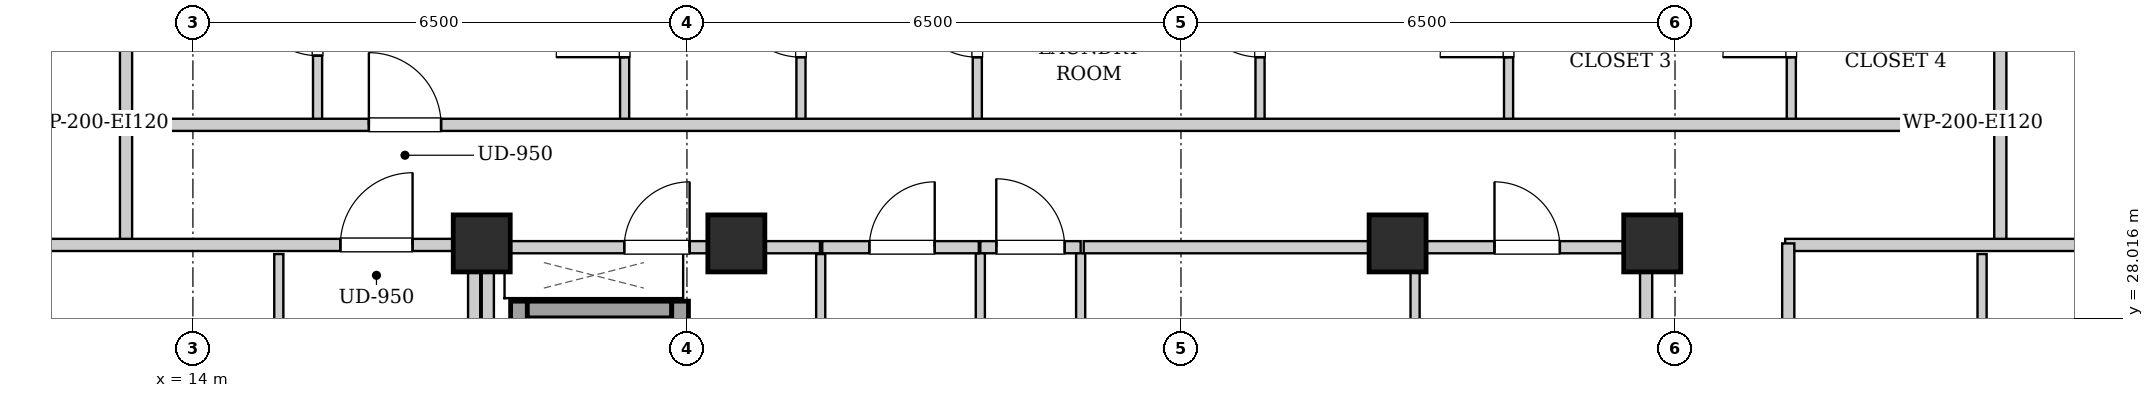
"""IFC4 building model, lengths in metres.
Left out: names, types, materials, properties, quantities, classifications, styles, units other than length and angle.
Written with IfcOpenShell. Run it as: python <this file> out.ifc"""

import sys

from ifc_helpers import new_model, si_unit, direction, frame, frame_2d, origin, origin_2d, place, context, subcontext, project, spatial, rectangle, extrude, element, fill, save


model = new_model("IFC4")
c1 = context("Model", 3, precision=1e-05, world=origin(), true_north=direction((0.0, 1.0)))
c2 = subcontext(c1, "Body", "Model", "MODEL_VIEW")
j1 = project(units=[si_unit("LENGTHUNIT", "METRE"), si_unit("PLANEANGLEUNIT", "RADIAN")], contexts=[c1])
p1 = place(None, origin())
s1 = spatial("IfcSite", under=j1, at=p1, CompositionType="ELEMENT")
p2 = place(p1, origin())
s2 = spatial("IfcBuilding", under=s1, at=p2, CompositionType="ELEMENT")
p3 = place(p2, frame((0.0, 0.0, 244.5)))
s3 = spatial("IfcBuildingStorey", under=s2, at=p3, CompositionType="ELEMENT", Elevation=244.5)
for number, where, z_axis, x_axis in (
    (1, (17.8, 29.0, 0.0), (0.0, 0.0, 1.0), (1.0, 0.0, 0.0)),
    (2, (21.15, 29.0, 0.0), (0.0, 0.0, 1.0), (1.0, 0.0, 0.0)),
    (3, (29.85, 29.0, 0.0), (0.0, 0.0, 1.0), (1.0, 0.0, 0.0)),
    (4, (33.2, 29.0, 0.0), (0.0, 0.0, 1.0), (1.0, 0.0, 0.0)),
):
    element("IfcColumn", number, at=place(p3, frame(where, z_axis=z_axis, x_axis=x_axis)), inside=s3, PredefinedType="COLUMN", context=c2, shape_type="SweptSolid", body=[
        extrude(rectangle(XDim=0.75, YDim=0.75, at=origin_2d()), origin(), (0.0, 0.0, 1.0), 3.4),
    ])
p4 = place(p3, frame((18.29, 24.1, 0.0), z_axis=(0.0, 0.0, 1.0), x_axis=(0.0, 1.0, 0.0)))
e5 = element("IfcWall", 5, at=p4, inside=s3, PredefinedType="SHEAR", context=c2, shape_type="SweptSolid", body=[
    extrude(rectangle(XDim=4.14, YDim=0.22, at=frame_2d((2.07, 0.0))), origin(), (0.0, 0.0, 1.0), 3.14),
])
p5 = place(p3, frame((18.4, 28.13, 0.0), z_axis=(0.0, 0.0, 1.0), x_axis=(1.0, 0.0, 0.0)))
e6 = element("IfcWall", 6, at=p5, inside=s3, PredefinedType="SHEAR", context=c2, shape_type="SweptSolid", body=[
    extrude(rectangle(XDim=1.9, YDim=0.22, at=frame_2d((0.95, 0.0))), origin(), (0.0, 0.0, 1.0), 3.14),
])
p6 = place(p3, frame((20.41, 26.06, 0.0), z_axis=(0.0, 0.0, 1.0), x_axis=(0.0, 1.0, 0.0)))
e7 = element("IfcWall", 7, at=p6, inside=s3, PredefinedType="SHEAR", context=c2, shape_type="SweptSolid", body=[
    extrude(rectangle(XDim=2.18, YDim=0.22, at=frame_2d((1.09, 0.0))), origin(), (0.0, 0.0, 1.0), 3.14),
])
p7 = place(p6, frame((0.54, 0.0, 0.0)))
e8 = element("IfcOpeningElement", 8, at=p7, cuts=e7, PredefinedType="OPENING", context=c2, shape_type="SweptSolid", body=[
    extrude(rectangle(XDim=1.1, YDim=2.15, at=frame_2d((0.55, 1.075))), frame((0.0, 0.12, 0.0), z_axis=(0.0, -1.0, 0.0), x_axis=(1.0, 0.0, 0.0)), (0.0, 0.0, 1.0), 0.24),
])
for number, where, z_axis, x_axis in (
    (9, (17.88, 24.12, 0.0), (0.0, 0.0, 1.0), (0.0, 1.0, 0.0)),
    (10, (33.12, 24.12, 0.0), (0.0, 0.0, 1.0), (0.0, 1.0, 0.0)),
):
    element("IfcWall", number, at=place(p3, frame(where, z_axis=z_axis, x_axis=x_axis)), inside=s3, PredefinedType="PARTITIONING", context=c2, shape_type="SweptSolid", body=[
        extrude(rectangle(XDim=4.76, YDim=0.16, at=frame_2d((2.38, 0.0))), origin(), (0.0, 0.0, 1.0), 3.14),
    ])
p8 = place(p3, frame((24.36, 28.95, 0.0), z_axis=(0.0, 0.0, 1.0), x_axis=(1.0, 0.0, 0.0)))
e11 = element("IfcWall", 11, at=p8, inside=s3, PredefinedType="PARTITIONING", context=c2, shape_type="SweptSolid", body=[
    extrude(rectangle(XDim=1.32, YDim=0.16, at=frame_2d((0.66, 0.0))), origin(), (0.0, 0.0, 1.0), 2.668),
])
p9 = place(p8, frame((0.21, 0.0, 0.0)))
e12 = element("IfcOpeningElement", 12, at=p9, cuts=e11, PredefinedType="OPENING", context=c2, shape_type="SweptSolid", body=[
    extrude(rectangle(XDim=0.9, YDim=2.05, at=frame_2d((0.45, 1.025))), frame((0.0, 0.09, 0.0), z_axis=(0.0, -1.0, 0.0), x_axis=(1.0, 0.0, 0.0)), (0.0, 0.0, 1.0), 0.18),
])
p10 = place(p3, frame((17.96, 28.95, 0.0), z_axis=(0.0, 0.0, 1.0), x_axis=(1.0, 0.0, 0.0)))
e13 = element("IfcWall", 13, at=p10, inside=s3, PredefinedType="PARTITIONING", context=c2, shape_type="SweptSolid", body=[
    extrude(rectangle(XDim=4.29, YDim=0.16, at=frame_2d((2.145, 0.0))), origin(), (0.0, 0.0, 1.0), 2.668),
])
p11 = place(p10, frame((1.715, 0.0, 0.0)))
e14 = element("IfcOpeningElement", 14, at=p11, cuts=e13, PredefinedType="OPENING", context=c2, shape_type="SweptSolid", body=[
    extrude(rectangle(XDim=0.86, YDim=2.05, at=frame_2d((0.43, 1.025))), frame((0.0, 0.09, 0.0), z_axis=(0.0, -1.0, 0.0), x_axis=(1.0, 0.0, 0.0)), (0.0, 0.0, 1.0), 0.18),
])
for number, where, z_axis, x_axis in (
    (15, (24.36, 25.0, 0.0), (0.0, 0.0, 1.0), (0.0, 1.0, 0.0)),
    (16, (25.68, 25.0, 0.0), (0.0, 0.0, 1.0), (0.0, 1.0, 0.0)),
):
    element("IfcWall", number, at=place(p3, frame(where, z_axis=z_axis, x_axis=x_axis)), inside=s3, PredefinedType="PARTITIONING", context=c2, shape_type="SweptSolid", body=[
        extrude(rectangle(XDim=3.87, YDim=0.12, at=frame_2d((1.935, 0.0))), origin(), (0.0, 0.0, 1.0), 3.14),
    ])
p12 = place(p3, frame((30.08, 26.18, 0.0), z_axis=(0.0, 0.0, 1.0), x_axis=(0.0, 1.0, 0.0)))
e17 = element("IfcWall", 17, at=p12, inside=s3, PredefinedType="PARTITIONING", context=c2, shape_type="SweptSolid", body=[
    extrude(rectangle(XDim=2.68, YDim=0.12, at=frame_2d((1.34, 0.0))), origin(), (0.0, 0.0, 1.0), 3.14),
])
p13 = place(p3, frame((30.08, 28.95, 0.0), z_axis=(0.0, 0.0, 1.0), x_axis=(1.0, 0.0, 0.0)))
e18 = element("IfcWall", 18, at=p13, inside=s3, PredefinedType="PARTITIONING", context=c2, shape_type="SweptSolid", body=[
    extrude(rectangle(XDim=2.96, YDim=0.16, at=frame_2d((1.48, 0.0))), origin(), (0.0, 0.0, 1.0), 3.14),
])
p14 = place(p13, frame((1.045, 0.0, 0.0)))
e19 = element("IfcOpeningElement", 19, at=p14, cuts=e18, PredefinedType="OPENING", context=c2, shape_type="SweptSolid", body=[
    extrude(rectangle(XDim=0.86, YDim=2.05, at=frame_2d((0.43, 1.025))), frame((0.0, 0.09, 0.0), z_axis=(0.0, -1.0, 0.0), x_axis=(1.0, 0.0, 0.0)), (0.0, 0.0, 1.0), 0.18),
])
p15 = place(p3, frame((22.26, 25.0, 0.0), z_axis=(0.0, 0.0, 1.0), x_axis=(0.0, 1.0, 0.0)))
e20 = element("IfcWall", 20, at=p15, inside=s3, PredefinedType="PARTITIONING", context=c2, shape_type="SweptSolid", body=[
    extrude(rectangle(XDim=3.86, YDim=0.12, at=frame_2d((1.93, 0.0))), origin(), (0.0, 0.0, 1.0), 3.14),
])
p16 = place(p3, frame((22.28, 28.95, 0.0), z_axis=(0.0, 0.0, 1.0), x_axis=(1.0, 0.0, 0.0)))
e21 = element("IfcWall", 21, at=p16, inside=s3, PredefinedType="PARTITIONING", context=c2, shape_type="SweptSolid", body=[
    extrude(rectangle(XDim=2.06, YDim=0.16, at=frame_2d((1.03, 0.0))), origin(), (0.0, 0.0, 1.0), 2.668),
])
p17 = place(p16, frame((0.62, 0.0, 0.0)))
e22 = element("IfcOpeningElement", 22, at=p17, cuts=e21, PredefinedType="OPENING", context=c2, shape_type="SweptSolid", body=[
    extrude(rectangle(XDim=0.86, YDim=2.05, at=frame_2d((0.43, 1.025))), frame((0.0, 0.09, 0.0), z_axis=(0.0, -1.0, 0.0), x_axis=(1.0, 0.0, 0.0)), (0.0, 0.0, 1.0), 0.18),
])
p18 = place(p3, frame((25.72, 28.95, 0.0), z_axis=(0.0, 0.0, 1.0), x_axis=(1.0, 0.0, 0.0)))
e23 = element("IfcWall", 23, at=p18, inside=s3, PredefinedType="PARTITIONING", context=c2, shape_type="SweptSolid", body=[
    extrude(rectangle(XDim=4.32, YDim=0.16, at=frame_2d((2.16, 0.0))), origin(), (0.0, 0.0, 1.0), 2.668),
])
for number, where, z_axis, x_axis in (
    (24, (13.12, 28.98, 0.0), (0.0, 0.0, 1.0), (0.0, 1.0, 0.0)),
    (25, (37.78, 28.98, 0.0), (0.0, 0.0, 1.0), (0.0, 1.0, 0.0)),
):
    element("IfcWall", number, at=place(p3, frame(where, z_axis=z_axis, x_axis=x_axis)), inside=s3, PredefinedType="PARTITIONING", context=c2, shape_type="SweptSolid", body=[
        extrude(rectangle(XDim=1.58, YDim=0.16, at=frame_2d((0.79, 0.0))), origin(), (0.0, 0.0, 1.0), 3.14),
    ])
p19 = place(p3, frame((34.95, 28.98, 0.0), z_axis=(0.0, 0.0, 1.0), x_axis=(1.0, 0.0, 0.0)))
e26 = element("IfcWall", 26, at=p19, inside=s3, PredefinedType="PARTITIONING", context=c2, shape_type="SweptSolid", body=[
    extrude(rectangle(XDim=5.07, YDim=0.16, at=frame_2d((2.535, 0.0))), origin(), (0.0, 0.0, 1.0), 2.668),
])
for number, where, z_axis, x_axis in (
    (27, (13.12, 30.6, 0.0), (0.0, 0.0, 1.0), (0.0, 1.0, 0.0)),
    (28, (37.78, 30.6, 0.0), (0.0, 0.0, 1.0), (0.0, 1.0, 0.0)),
):
    element("IfcWall", number, at=place(p3, frame(where, z_axis=z_axis, x_axis=x_axis)), inside=s3, PredefinedType="PARTITIONING", context=c2, shape_type="SweptSolid", body=[
        extrude(rectangle(XDim=2.66, YDim=0.16, at=frame_2d((1.33, 0.0))), origin(), (0.0, 0.0, 1.0), 3.14),
    ])
p20 = place(p3, frame((15.64, 30.6, 0.0), z_axis=(0.0, 0.0, 1.0), x_axis=(0.0, 1.0, 0.0)))
e29 = element("IfcWall", 29, at=p20, inside=s3, PredefinedType="PARTITIONING", context=c2, shape_type="SweptSolid", body=[
    extrude(rectangle(XDim=2.6, YDim=0.12, at=frame_2d((1.3, 0.0))), origin(), (0.0, 0.0, 1.0), 3.14),
])
p21 = place(p20, frame((0.87, 0.0, 0.0)))
e30 = element("IfcOpeningElement", 30, at=p21, cuts=e29, PredefinedType="OPENING", context=c2, shape_type="SweptSolid", body=[
    extrude(rectangle(XDim=0.86, YDim=2.05, at=frame_2d((0.43, 1.025))), frame((0.0, 0.07, 0.0), z_axis=(0.0, -1.0, 0.0), x_axis=(1.0, 0.0, 0.0)), (0.0, 0.0, 1.0), 0.14),
])
p22 = place(p3, frame((19.68, 30.6, 0.0), z_axis=(0.0, 0.0, 1.0), x_axis=(0.0, 1.0, 0.0)))
e31 = element("IfcWall", 31, at=p22, inside=s3, PredefinedType="PARTITIONING", context=c2, shape_type="SweptSolid", body=[
    extrude(rectangle(XDim=2.6, YDim=0.12, at=frame_2d((1.3, 0.0))), origin(), (0.0, 0.0, 1.0), 3.14),
])
p23 = place(p22, frame((0.85, 0.0, 0.0)))
e32 = element("IfcOpeningElement", 32, at=p23, cuts=e31, PredefinedType="OPENING", context=c2, shape_type="SweptSolid", body=[
    extrude(rectangle(XDim=0.9, YDim=2.05, at=frame_2d((0.45, 1.025))), frame((0.0, 0.07, 0.0), z_axis=(0.0, -1.0, 0.0), x_axis=(1.0, 0.0, 0.0)), (0.0, 0.0, 1.0), 0.14),
])
p24 = place(p3, frame((22.0, 30.6, 0.0), z_axis=(0.0, 0.0, 1.0), x_axis=(0.0, 1.0, 0.0)))
e33 = element("IfcWall", 33, at=p24, inside=s3, PredefinedType="PARTITIONING", context=c2, shape_type="SweptSolid", body=[
    extrude(rectangle(XDim=2.6, YDim=0.12, at=frame_2d((1.3, 0.0))), origin(), (0.0, 0.0, 1.0), 3.14),
])
p25 = place(p24, frame((0.85, 0.0, 0.0)))
e34 = element("IfcOpeningElement", 34, at=p25, cuts=e33, PredefinedType="OPENING", context=c2, shape_type="SweptSolid", body=[
    extrude(rectangle(XDim=0.9, YDim=2.05, at=frame_2d((0.45, 1.025))), frame((0.0, 0.07, 0.0), z_axis=(0.0, -1.0, 0.0), x_axis=(1.0, 0.0, 0.0)), (0.0, 0.0, 1.0), 0.14),
])
p26 = place(p3, frame((24.32, 30.6, 0.0), z_axis=(0.0, 0.0, 1.0), x_axis=(0.0, 1.0, 0.0)))
e35 = element("IfcWall", 35, at=p26, inside=s3, PredefinedType="PARTITIONING", context=c2, shape_type="SweptSolid", body=[
    extrude(rectangle(XDim=2.6, YDim=0.12, at=frame_2d((1.3, 0.0))), origin(), (0.0, 0.0, 1.0), 3.14),
])
p27 = place(p26, frame((0.85, 0.0, 0.0)))
e36 = element("IfcOpeningElement", 36, at=p27, cuts=e35, PredefinedType="OPENING", context=c2, shape_type="SweptSolid", body=[
    extrude(rectangle(XDim=0.9, YDim=2.05, at=frame_2d((0.45, 1.025))), frame((0.0, 0.07, 0.0), z_axis=(0.0, -1.0, 0.0), x_axis=(1.0, 0.0, 0.0)), (0.0, 0.0, 1.0), 0.14),
])
p28 = place(p3, frame((28.04, 30.6, 0.0), z_axis=(0.0, 0.0, 1.0), x_axis=(0.0, 1.0, 0.0)))
e37 = element("IfcWall", 37, at=p28, inside=s3, PredefinedType="PARTITIONING", context=c2, shape_type="SweptSolid", body=[
    extrude(rectangle(XDim=2.6, YDim=0.12, at=frame_2d((1.3, 0.0))), origin(), (0.0, 0.0, 1.0), 3.14),
])
p29 = place(p28, frame((0.85, 0.0, 0.0)))
e38 = element("IfcOpeningElement", 38, at=p29, cuts=e37, PredefinedType="OPENING", context=c2, shape_type="SweptSolid", body=[
    extrude(rectangle(XDim=0.9, YDim=2.05, at=frame_2d((0.45, 1.025))), frame((0.0, 0.07, 0.0), z_axis=(0.0, -1.0, 0.0), x_axis=(1.0, 0.0, 0.0)), (0.0, 0.0, 1.0), 0.14),
])
p30 = place(p3, frame((31.31, 30.6, 0.0), z_axis=(0.0, 0.0, 1.0), x_axis=(0.0, 1.0, 0.0)))
e39 = element("IfcWall", 39, at=p30, inside=s3, PredefinedType="PARTITIONING", context=c2, shape_type="SweptSolid", body=[
    extrude(rectangle(XDim=2.6, YDim=0.12, at=frame_2d((1.3, 0.0))), origin(), (0.0, 0.0, 1.0), 3.14),
])
p31 = place(p30, frame((0.85, 0.0, 0.0)))
e40 = element("IfcOpeningElement", 40, at=p31, cuts=e39, PredefinedType="OPENING", context=c2, shape_type="SweptSolid", body=[
    extrude(rectangle(XDim=0.9, YDim=2.05, at=frame_2d((0.45, 1.025))), frame((0.0, 0.07, 0.0), z_axis=(0.0, -1.0, 0.0), x_axis=(1.0, 0.0, 0.0)), (0.0, 0.0, 1.0), 0.14),
])
p32 = place(p3, frame((35.03, 30.6, 0.0), z_axis=(0.0, 0.0, 1.0), x_axis=(0.0, 1.0, 0.0)))
e41 = element("IfcWall", 41, at=p32, inside=s3, PredefinedType="PARTITIONING", context=c2, shape_type="SweptSolid", body=[
    extrude(rectangle(XDim=2.6, YDim=0.12, at=frame_2d((1.3, 0.0))), origin(), (0.0, 0.0, 1.0), 3.14),
])
p33 = place(p32, frame((0.85, 0.0, 0.0)))
e42 = element("IfcOpeningElement", 42, at=p33, cuts=e41, PredefinedType="OPENING", context=c2, shape_type="SweptSolid", body=[
    extrude(rectangle(XDim=0.9, YDim=2.05, at=frame_2d((0.45, 1.025))), frame((0.0, 0.07, 0.0), z_axis=(0.0, -1.0, 0.0), x_axis=(1.0, 0.0, 0.0)), (0.0, 0.0, 1.0), 0.14),
])
p34 = place(p3, frame((10.88, 28.98, 0.0), z_axis=(0.0, 0.0, 1.0), x_axis=(1.0, 0.0, 0.0)))
e43 = element("IfcWall", 43, at=p34, inside=s3, PredefinedType="PARTITIONING", context=c2, shape_type="SweptSolid", body=[
    extrude(rectangle(XDim=6.88, YDim=0.16, at=frame_2d((3.44, 0.0))), origin(), (0.0, 0.0, 1.0), 2.668),
])
p35 = place(p34, frame((5.06, 0.0, 0.0)))
e44 = element("IfcOpeningElement", 44, at=p35, cuts=e43, PredefinedType="OPENING", context=c2, shape_type="SweptSolid", body=[
    extrude(rectangle(XDim=0.95, YDim=2.1, at=frame_2d((0.475, 1.05))), frame((0.0, 0.09, 0.0), z_axis=(0.0, -1.0, 0.0), x_axis=(1.0, 0.0, 0.0)), (0.0, 0.0, 1.0), 0.18),
])
p36 = place(p3, frame((15.13, 24.36, 0.0), z_axis=(0.0, 0.0, 1.0), x_axis=(0.0, 1.0, 0.0)))
e45 = element("IfcWall", 45, at=p36, inside=s3, PredefinedType="PARTITIONING", context=c2, shape_type="SweptSolid", body=[
    extrude(rectangle(XDim=4.5, YDim=0.12, at=frame_2d((2.25, 0.0))), origin(), (0.0, 0.0, 1.0), 3.14),
])
p37 = place(p36, frame((1.8, 0.0, 0.0)))
e46 = element("IfcOpeningElement", 46, at=p37, cuts=e45, PredefinedType="OPENING", context=c2, shape_type="SweptSolid", body=[
    extrude(rectangle(XDim=0.9, YDim=2.05, at=frame_2d((0.45, 1.025))), frame((0.0, 0.07, 0.0), z_axis=(0.0, -1.0, 0.0), x_axis=(1.0, 0.0, 0.0)), (0.0, 0.0, 1.0), 0.14),
])
p38 = place(p3, frame((37.54, 24.552, 0.0), z_axis=(0.0, 0.0, 1.0), x_axis=(0.0, 1.0, 0.0)))
e47 = element("IfcWall", 47, at=p38, inside=s3, PredefinedType="PARTITIONING", context=c2, shape_type="SweptSolid", body=[
    extrude(rectangle(XDim=4.308, YDim=0.12, at=frame_2d((2.154, 0.0))), origin(), (0.0, 0.0, 1.0), 3.14),
])
p39 = place(p38, frame((1.704, 0.0, 0.0)))
e48 = element("IfcOpeningElement", 48, at=p39, cuts=e47, PredefinedType="OPENING", context=c2, shape_type="SweptSolid", body=[
    extrude(rectangle(XDim=0.9, YDim=2.05, at=frame_2d((0.45, 1.025))), frame((0.0, 0.07, 0.0), z_axis=(0.0, -1.0, 0.0), x_axis=(1.0, 0.0, 0.0)), (0.0, 0.0, 1.0), 0.14),
])
p40 = place(p3, frame((13.15, 30.56, 0.0), z_axis=(0.0, 0.0, 1.0), x_axis=(1.0, 0.0, 0.0)))
e49 = element("IfcWall", 49, at=p40, inside=s3, PredefinedType="PARTITIONING", context=c2, shape_type="SweptSolid", body=[
    extrude(rectangle(XDim=24.6, YDim=0.16, at=frame_2d((12.3, 0.0))), origin(), (0.0, 0.0, 1.0), 3.14),
])
p41 = place(p40, frame((3.165, 0.0, 0.0)))
e50 = element("IfcOpeningElement", 50, at=p41, cuts=e49, PredefinedType="OPENING", context=c2, shape_type="SweptSolid", body=[
    extrude(rectangle(XDim=0.95, YDim=2.1, at=frame_2d((0.475, 1.05))), frame((0.0, 0.09, 0.0), z_axis=(0.0, -1.0, 0.0), x_axis=(1.0, 0.0, 0.0)), (0.0, 0.0, 1.0), 0.18),
])
p42 = place(p3, frame((17.7, 15.02, 0.0), z_axis=(0.0, 0.0, 1.0), x_axis=(0.0, 1.0, 0.0)))
e51 = element("IfcWall", 51, at=p42, inside=s3, PredefinedType="PARTITIONING", context=c2, shape_type="SweptSolid", body=[
    extrude(rectangle(XDim=13.98, YDim=0.16, at=frame_2d((6.99, 0.0))), origin(), (0.0, 0.0, 1.0), 3.14),
])
p43 = place(p3, frame((34.99, 15.07, 0.0), z_axis=(0.0, 0.0, 1.0), x_axis=(0.0, 1.0, 0.0)))
e52 = element("IfcWall", 52, at=p43, inside=s3, PredefinedType="PARTITIONING", context=c2, shape_type="SweptSolid", body=[
    extrude(rectangle(XDim=13.93, YDim=0.16, at=frame_2d((6.965, 0.0))), origin(), (0.0, 0.0, 1.0), 3.14),
])
p44 = place(p43, frame((4.385, 0.0, 0.0)))
e53 = element("IfcOpeningElement", 53, at=p44, cuts=e52, PredefinedType="OPENING", context=c2, shape_type="SweptSolid", body=[
    extrude(rectangle(XDim=0.95, YDim=2.1, at=frame_2d((0.475, 1.05))), frame((0.0, 0.09, 0.0), z_axis=(0.0, -1.0, 0.0), x_axis=(1.0, 0.0, 0.0)), (0.0, 0.0, 1.0), 0.18),
])
p45 = place(p9, origin())
e54 = element("IfcDoor", 54, at=p45, inside=s3, OperationType="SINGLE_SWING_LEFT", PredefinedType="DOOR", context=c2, shape_type="SweptSolid", body=[
    extrude(rectangle(XDim=0.9, YDim=2.05, at=frame_2d((0.45, 1.025))), frame((0.0, 0.025, 0.0), z_axis=(0.0, -1.0, 0.0), x_axis=(1.0, 0.0, 0.0)), (0.0, 0.0, 1.0), 0.05),
])
fill(e12, e54)
p46 = place(p11, origin())
e55 = element("IfcDoor", 55, at=p46, inside=s3, OperationType="SINGLE_SWING_RIGHT", PredefinedType="DOOR", context=c2, shape_type="SweptSolid", body=[
    extrude(rectangle(XDim=0.86, YDim=2.05, at=frame_2d((0.43, 1.025))), frame((0.0, 0.025, 0.0), z_axis=(0.0, -1.0, 0.0), x_axis=(1.0, 0.0, 0.0)), (0.0, 0.0, 1.0), 0.05),
])
fill(e14, e55)
p47 = place(p14, origin())
e56 = element("IfcDoor", 56, at=p47, inside=s3, OperationType="SINGLE_SWING_LEFT", PredefinedType="DOOR", context=c2, shape_type="SweptSolid", body=[
    extrude(rectangle(XDim=0.86, YDim=2.05, at=frame_2d((0.43, 1.025))), frame((0.0, 0.025, 0.0), z_axis=(0.0, -1.0, 0.0), x_axis=(1.0, 0.0, 0.0)), (0.0, 0.0, 1.0), 0.05),
])
fill(e19, e56)
p48 = place(p17, origin())
e57 = element("IfcDoor", 57, at=p48, inside=s3, OperationType="SINGLE_SWING_RIGHT", PredefinedType="DOOR", context=c2, shape_type="SweptSolid", body=[
    extrude(rectangle(XDim=0.86, YDim=2.05, at=frame_2d((0.43, 1.025))), frame((0.0, 0.025, 0.0), z_axis=(0.0, -1.0, 0.0), x_axis=(1.0, 0.0, 0.0)), (0.0, 0.0, 1.0), 0.05),
])
fill(e22, e57)
p49 = place(p21, origin())
e58 = element("IfcDoor", 58, at=p49, inside=s3, OperationType="SINGLE_SWING_RIGHT", PredefinedType="DOOR", context=c2, shape_type="SweptSolid", body=[
    extrude(rectangle(XDim=0.86, YDim=2.05, at=frame_2d((0.43, 1.025))), frame((0.0, 0.025, 0.0), z_axis=(0.0, -1.0, 0.0), x_axis=(1.0, 0.0, 0.0)), (0.0, 0.0, 1.0), 0.05),
])
fill(e30, e58)
p50 = place(p23, origin())
e59 = element("IfcDoor", 59, at=p50, inside=s3, OperationType="SINGLE_SWING_LEFT", PredefinedType="DOOR", context=c2, shape_type="SweptSolid", body=[
    extrude(rectangle(XDim=0.9, YDim=2.05, at=frame_2d((0.45, 1.025))), frame((0.0, 0.025, 0.0), z_axis=(0.0, -1.0, 0.0), x_axis=(1.0, 0.0, 0.0)), (0.0, 0.0, 1.0), 0.05),
])
fill(e32, e59)
p51 = place(p25, origin())
e60 = element("IfcDoor", 60, at=p51, inside=s3, OperationType="SINGLE_SWING_RIGHT", PredefinedType="DOOR", context=c2, shape_type="SweptSolid", body=[
    extrude(rectangle(XDim=0.9, YDim=2.05, at=frame_2d((0.45, 1.025))), frame((0.0, 0.025, 0.0), z_axis=(0.0, -1.0, 0.0), x_axis=(1.0, 0.0, 0.0)), (0.0, 0.0, 1.0), 0.05),
])
fill(e34, e60)
p52 = place(p27, origin())
e61 = element("IfcDoor", 61, at=p52, inside=s3, OperationType="SINGLE_SWING_RIGHT", PredefinedType="DOOR", context=c2, shape_type="SweptSolid", body=[
    extrude(rectangle(XDim=0.9, YDim=2.05, at=frame_2d((0.45, 1.025))), frame((0.0, 0.025, 0.0), z_axis=(0.0, -1.0, 0.0), x_axis=(1.0, 0.0, 0.0)), (0.0, 0.0, 1.0), 0.05),
])
fill(e36, e61)
p53 = place(p29, origin())
e62 = element("IfcDoor", 62, at=p53, inside=s3, OperationType="SINGLE_SWING_RIGHT", PredefinedType="DOOR", context=c2, shape_type="SweptSolid", body=[
    extrude(rectangle(XDim=0.9, YDim=2.05, at=frame_2d((0.45, 1.025))), frame((0.0, 0.025, 0.0), z_axis=(0.0, -1.0, 0.0), x_axis=(1.0, 0.0, 0.0)), (0.0, 0.0, 1.0), 0.05),
])
fill(e38, e62)
p54 = place(p31, origin())
e63 = element("IfcDoor", 63, at=p54, inside=s3, OperationType="SINGLE_SWING_LEFT", PredefinedType="DOOR", context=c2, shape_type="SweptSolid", body=[
    extrude(rectangle(XDim=0.9, YDim=2.05, at=frame_2d((0.45, 1.025))), frame((0.0, 0.025, 0.0), z_axis=(0.0, -1.0, 0.0), x_axis=(1.0, 0.0, 0.0)), (0.0, 0.0, 1.0), 0.05),
])
fill(e40, e63)
p55 = place(p33, origin())
e64 = element("IfcDoor", 64, at=p55, inside=s3, OperationType="SINGLE_SWING_LEFT", PredefinedType="DOOR", context=c2, shape_type="SweptSolid", body=[
    extrude(rectangle(XDim=0.9, YDim=2.05, at=frame_2d((0.45, 1.025))), frame((0.0, 0.025, 0.0), z_axis=(0.0, -1.0, 0.0), x_axis=(1.0, 0.0, 0.0)), (0.0, 0.0, 1.0), 0.05),
])
fill(e42, e64)
p56 = place(p35, origin())
e65 = element("IfcDoor", 65, at=p56, inside=s3, OperationType="SINGLE_SWING_RIGHT", PredefinedType="DOOR", context=c2, shape_type="SweptSolid", body=[
    extrude(rectangle(XDim=0.95, YDim=2.1, at=frame_2d((0.475, 1.05))), frame((0.0, 0.025, 0.0), z_axis=(0.0, -1.0, 0.0), x_axis=(1.0, 0.0, 0.0)), (0.0, 0.0, 1.0), 0.05),
])
fill(e44, e65)
p57 = place(p41, origin())
e66 = element("IfcDoor", 66, at=p57, inside=s3, OperationType="SINGLE_SWING_LEFT", PredefinedType="DOOR", context=c2, shape_type="SweptSolid", body=[
    extrude(rectangle(XDim=0.95, YDim=2.1, at=frame_2d((0.475, 1.05))), frame((0.0, 0.025, 0.0), z_axis=(0.0, -1.0, 0.0), x_axis=(1.0, 0.0, 0.0)), (0.0, 0.0, 1.0), 0.05),
])
fill(e50, e66)
save(model, sys.argv[1])
